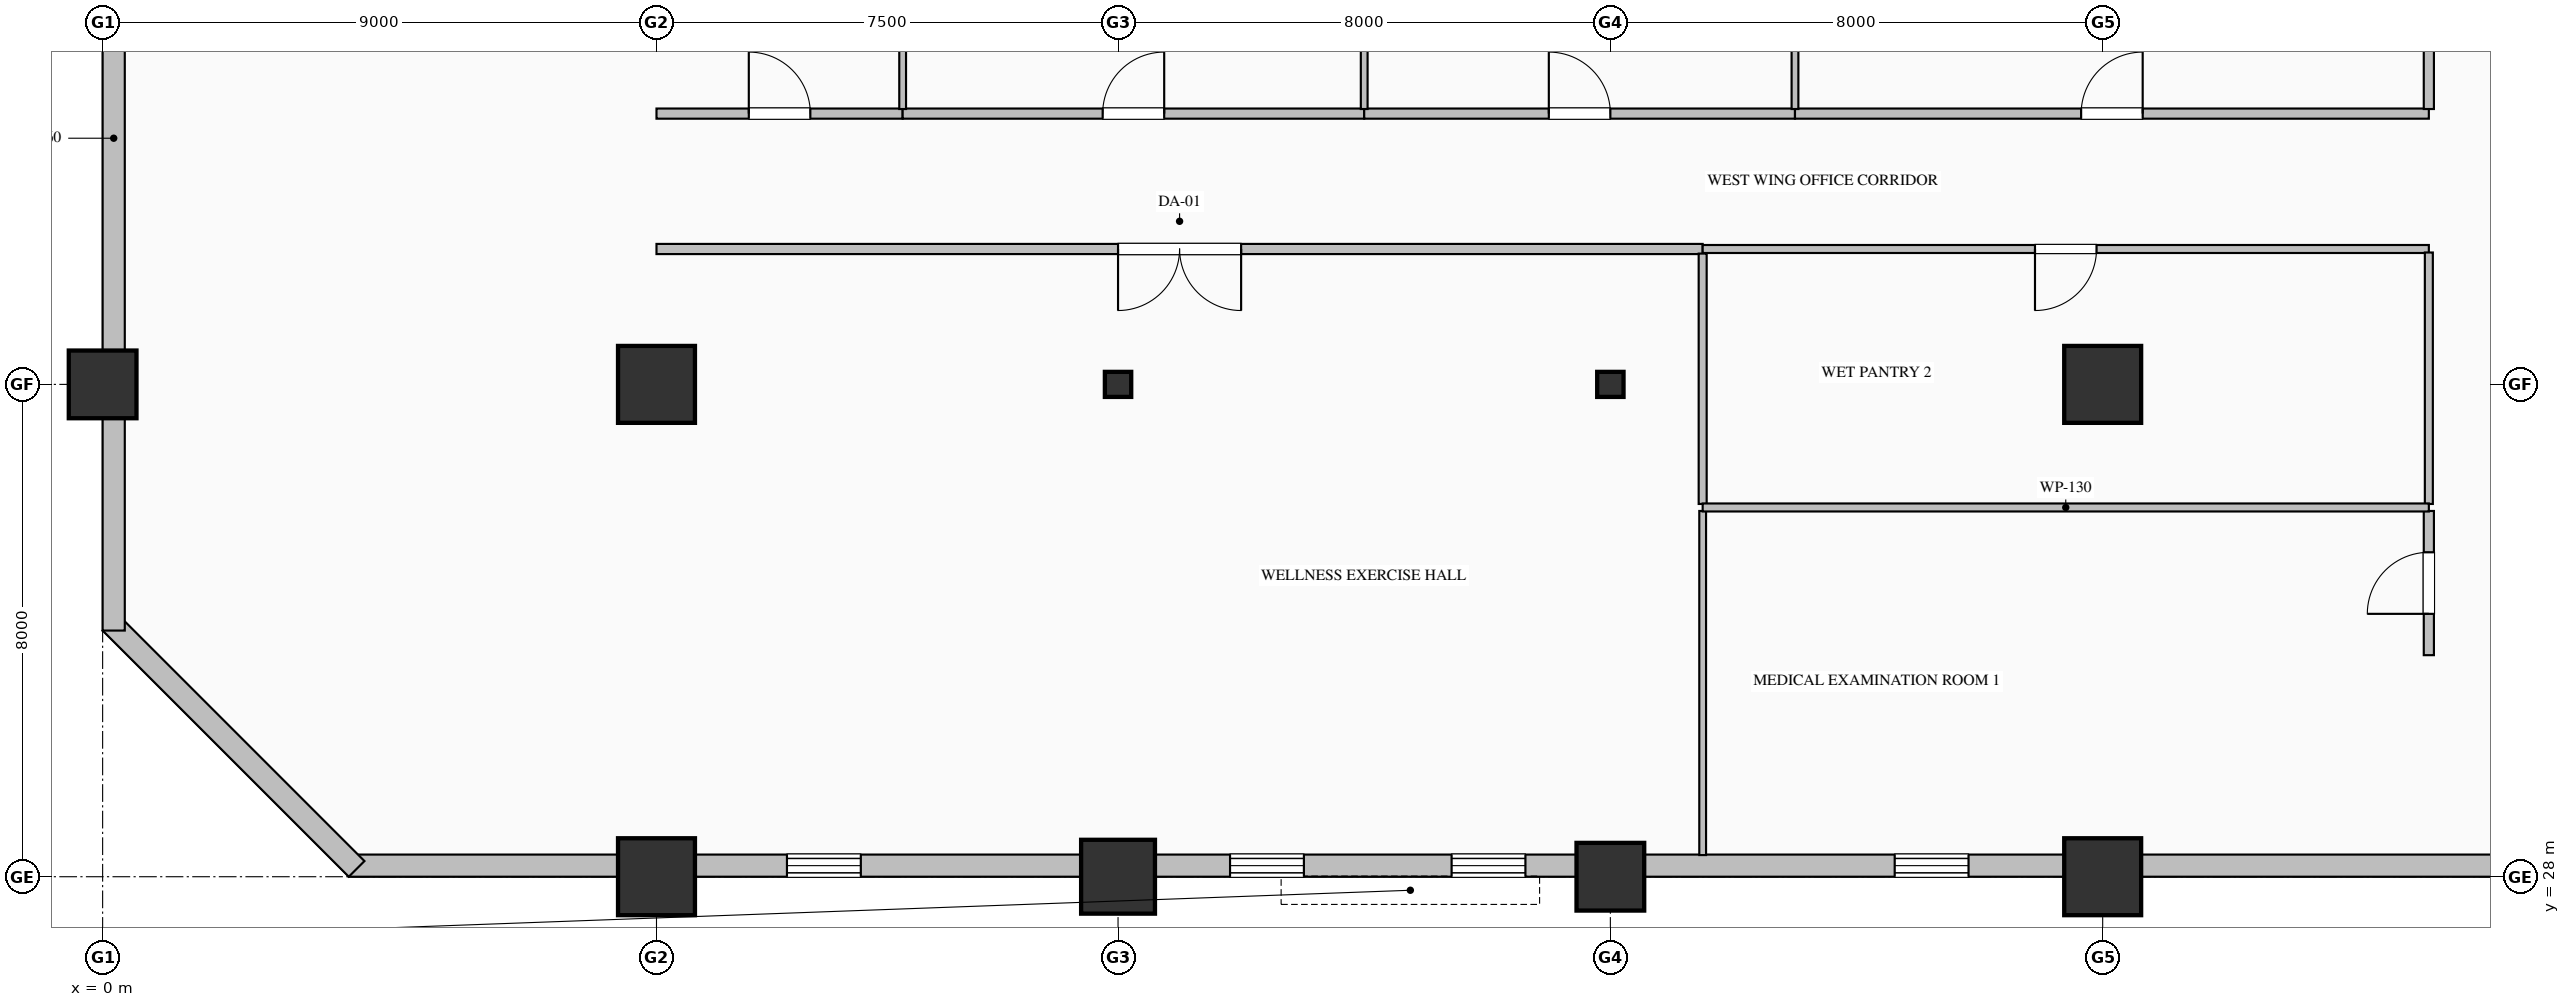
"""IFC4 building model, lengths in metres.
Left out: names, types, materials, properties, quantities, classifications, styles, units other than length and angle.
Written with IfcOpenShell. Run it as: python <this file> out.ifc"""

import sys

from ifc_helpers import new_model, si_unit, direction, frame, frame_2d, origin, origin_2d, place, context, subcontext, project, spatial, rectangle, hollow_rectangle, hollow_circle, i_section, extrude, element, fill, save


model = new_model("IFC4")
c1 = context("Model", 3, precision=1e-05, world=origin(), true_north=direction((0.0, 1.0)))
c2 = subcontext(c1, "Body", "Model", "MODEL_VIEW")
j1 = project(units=[si_unit("LENGTHUNIT", "METRE"), si_unit("PLANEANGLEUNIT", "RADIAN")], contexts=[c1])
p1 = place(None, origin())
s1 = spatial("IfcSite", under=j1, at=p1, CompositionType="ELEMENT")
p2 = place(p1, origin())
s2 = spatial("IfcBuilding", under=s1, at=p2, CompositionType="ELEMENT")
p3 = place(p2, frame((0.0, 0.0, 80.2)))
s3 = spatial("IfcBuildingStorey", under=s2, at=p3, CompositionType="ELEMENT", Elevation=80.2)
p4 = place(p3, frame((0.0, 36.0, 0.0), z_axis=(0.0, 0.0, 1.0), x_axis=(1.0, 0.0, 0.0)))
e1 = element("IfcColumn", 1, at=p4, inside=s3, PredefinedType="COLUMN", context=c2, shape_type="SweptSolid", body=[
    extrude(hollow_rectangle(XDim=1.1, YDim=1.1, WallThickness=0.04, at=origin_2d()), origin(), (0.0, 0.0, 1.0), 4.0),
])
for number, where, z_axis, x_axis in (
    (2, (9.0, 28.0, 0.0), (0.0, 0.0, 1.0), (1.0, 0.0, 0.0)),
    (3, (9.0, 36.0, 0.0), (0.0, 0.0, 1.0), (1.0, 0.0, 0.0)),
):
    element("IfcColumn", number, at=place(p3, frame(where, z_axis=z_axis, x_axis=x_axis)), inside=s3, PredefinedType="COLUMN", context=c2, shape_type="SweptSolid", body=[
        extrude(hollow_rectangle(XDim=1.25, YDim=1.25, WallThickness=0.045, at=origin_2d()), origin(), (0.0, 0.0, 1.0), 4.0),
    ])
p5 = place(p3, frame((16.5, 28.0, 0.0), z_axis=(0.0, 0.0, 1.0), x_axis=(1.0, 0.0, 0.0)))
e4 = element("IfcColumn", 4, at=p5, inside=s3, PredefinedType="COLUMN", context=c2, shape_type="SweptSolid", body=[
    extrude(hollow_circle(Radius=0.6, WallThickness=0.04, at=origin_2d()), origin(), (0.0, 0.0, 1.0), 4.0),
])
p6 = place(p3, frame((16.5, 36.0, 0.0), z_axis=(0.0, 0.0, 1.0), x_axis=(1.0, 0.0, 0.0)))
e5 = element("IfcColumn", 5, at=p6, inside=s3, PredefinedType="COLUMN", context=c2, shape_type="SweptSolid", body=[
    extrude(i_section(OverallWidth=0.407, OverallDepth=0.428, WebThickness=0.02, FlangeThickness=0.035, FilletRadius=0.022, at=origin_2d()), origin(), (0.0, 0.0, 1.0), 4.0),
])
p7 = place(p3, frame((24.5, 28.0, 0.0), z_axis=(0.0, 0.0, 1.0), x_axis=(1.0, 0.0, 0.0)))
e6 = element("IfcColumn", 6, at=p7, inside=s3, PredefinedType="COLUMN", context=c2, shape_type="SweptSolid", body=[
    extrude(hollow_rectangle(XDim=1.1, YDim=1.1, WallThickness=0.04, at=origin_2d()), origin(), (0.0, 0.0, 1.0), 4.0),
])
p8 = place(p3, frame((24.5, 36.0, 0.0), z_axis=(0.0, 0.0, 1.0), x_axis=(1.0, 0.0, 0.0)))
e7 = element("IfcColumn", 7, at=p8, inside=s3, PredefinedType="COLUMN", context=c2, shape_type="SweptSolid", body=[
    extrude(i_section(OverallWidth=0.407, OverallDepth=0.428, WebThickness=0.02, FlangeThickness=0.035, FilletRadius=0.022, at=origin_2d()), origin(), (0.0, 0.0, 1.0), 4.0),
])
for number, where, z_axis, x_axis in (
    (8, (32.5, 28.0, 0.0), (0.0, 0.0, 1.0), (1.0, 0.0, 0.0)),
    (9, (32.5, 36.0, 0.0), (0.0, 0.0, 1.0), (1.0, 0.0, 0.0)),
):
    element("IfcColumn", number, at=place(p3, frame(where, z_axis=z_axis, x_axis=x_axis)), inside=s3, PredefinedType="COLUMN", context=c2, shape_type="SweptSolid", body=[
        extrude(hollow_rectangle(XDim=1.25, YDim=1.25, WallThickness=0.045, at=origin_2d()), origin(), (0.0, 0.0, 1.0), 4.0),
    ])
p9 = place(p3, frame((40.52, 28.18, 0.0), z_axis=(0.0, 0.0, 1.0), x_axis=(-1.0, 0.0, 0.0)))
e10 = element("IfcWall", 10, at=p9, inside=s3, PredefinedType="SOLIDWALL", context=c2, shape_type="SweptSolid", body=[
    extrude(rectangle(XDim=36.52, YDim=0.36, at=frame_2d((18.26, 0.0))), origin(), (0.0, 0.0, 1.0), 3.05),
])
p10 = place(p9, frame((10.2, 0.0, 0.7)))
e11 = element("IfcOpeningElement", 11, at=p10, cuts=e10, PredefinedType="OPENING", context=c2, shape_type="SweptSolid", body=[
    extrude(rectangle(XDim=1.2, YDim=1.85, at=frame_2d((0.6, 0.925))), frame((0.0, 0.19, 0.0), z_axis=(0.0, -1.0, 0.0), x_axis=(1.0, 0.0, 0.0)), (0.0, 0.0, 1.0), 0.38),
])
p11 = place(p9, frame((17.4, 0.0, 0.7)))
e12 = element("IfcOpeningElement", 12, at=p11, cuts=e10, PredefinedType="OPENING", context=c2, shape_type="SweptSolid", body=[
    extrude(rectangle(XDim=1.2, YDim=1.85, at=frame_2d((0.6, 0.925))), frame((0.0, 0.19, 0.0), z_axis=(0.0, -1.0, 0.0), x_axis=(1.0, 0.0, 0.0)), (0.0, 0.0, 1.0), 0.38),
])
p12 = place(p9, frame((21.0, 0.0, 0.7)))
e13 = element("IfcOpeningElement", 13, at=p12, cuts=e10, PredefinedType="OPENING", context=c2, shape_type="SweptSolid", body=[
    extrude(rectangle(XDim=1.2, YDim=1.85, at=frame_2d((0.6, 0.925))), frame((0.0, 0.19, 0.0), z_axis=(0.0, -1.0, 0.0), x_axis=(1.0, 0.0, 0.0)), (0.0, 0.0, 1.0), 0.38),
])
p13 = place(p9, frame((28.2, 0.0, 0.7)))
e14 = element("IfcOpeningElement", 14, at=p13, cuts=e10, PredefinedType="OPENING", context=c2, shape_type="SweptSolid", body=[
    extrude(rectangle(XDim=1.2, YDim=1.85, at=frame_2d((0.6, 0.925))), frame((0.0, 0.19, 0.0), z_axis=(0.0, -1.0, 0.0), x_axis=(1.0, 0.0, 0.0)), (0.0, 0.0, 1.0), 0.38),
])
p14 = place(p3, frame((4.127, 28.127, 0.0), z_axis=(0.0, 0.0, 1.0), x_axis=(-0.707106781187, 0.707106781187, 0.0)))
e15 = element("IfcWall", 15, at=p14, inside=s3, PredefinedType="SOLIDWALL", context=c2, shape_type="SweptSolid", body=[
    extrude(rectangle(XDim=5.657, YDim=0.36, at=frame_2d((2.828, 0.0))), origin(), (0.0, 0.0, 1.0), 3.75),
])
p15 = place(p3, frame((0.18, 32.0, 0.0), z_axis=(0.0, 0.0, 1.0), x_axis=(0.0, 1.0, 0.0)))
e16 = element("IfcWall", 16, at=p15, inside=s3, PredefinedType="SOLIDWALL", context=c2, shape_type="SweptSolid", body=[
    extrude(rectangle(XDim=16.0, YDim=0.36, at=frame_2d((8.0, 0.0))), origin(), (0.0, 0.0, 1.0), 3.25),
])
p16 = place(p3, frame((9.0, 40.4, 0.0), z_axis=(0.0, 0.0, 1.0), x_axis=(1.0, 0.0, 0.0)))
e17 = element("IfcWall", 17, at=p16, inside=s3, PredefinedType="PARTITIONING", context=c2, shape_type="SweptSolid", body=[
    extrude(rectangle(XDim=4.0, YDim=0.165, at=frame_2d((2.0, 0.0))), origin(), (0.0, 0.0, 1.0), 3.75),
])
p17 = place(p16, frame((1.5, 0.0, 0.0)))
e18 = element("IfcOpeningElement", 18, at=p17, cuts=e17, PredefinedType="OPENING", context=c2, shape_type="SweptSolid", body=[
    extrude(rectangle(XDim=1.0, YDim=2.15, at=frame_2d((0.5, 1.075))), frame((0.0, 0.093, 0.0), z_axis=(0.0, -1.0, 0.0), x_axis=(1.0, 0.0, 0.0)), (0.0, 0.0, 1.0), 0.185),
])
p18 = place(p3, frame((13.0, 40.4, 0.0), z_axis=(0.0, 0.0, 1.0), x_axis=(1.0, 0.0, 0.0)))
e19 = element("IfcWall", 19, at=p18, inside=s3, PredefinedType="PARTITIONING", context=c2, shape_type="SweptSolid", body=[
    extrude(rectangle(XDim=7.5, YDim=0.165, at=frame_2d((3.75, 0.0))), origin(), (0.0, 0.0, 1.0), 3.75),
])
p19 = place(p18, frame((3.25, 0.0, 0.0)))
e20 = element("IfcOpeningElement", 20, at=p19, cuts=e19, PredefinedType="OPENING", context=c2, shape_type="SweptSolid", body=[
    extrude(rectangle(XDim=1.0, YDim=2.15, at=frame_2d((0.5, 1.075))), frame((0.0, 0.093, 0.0), z_axis=(0.0, -1.0, 0.0), x_axis=(1.0, 0.0, 0.0)), (0.0, 0.0, 1.0), 0.185),
])
p20 = place(p3, frame((20.5, 40.4, 0.0), z_axis=(0.0, 0.0, 1.0), x_axis=(1.0, 0.0, 0.0)))
e21 = element("IfcWall", 21, at=p20, inside=s3, PredefinedType="PARTITIONING", context=c2, shape_type="SweptSolid", body=[
    extrude(rectangle(XDim=7.0, YDim=0.165, at=frame_2d((3.5, 0.0))), origin(), (0.0, 0.0, 1.0), 3.75),
])
p21 = place(p20, frame((3.0, 0.0, 0.0)))
e22 = element("IfcOpeningElement", 22, at=p21, cuts=e21, PredefinedType="OPENING", context=c2, shape_type="SweptSolid", body=[
    extrude(rectangle(XDim=1.0, YDim=2.15, at=frame_2d((0.5, 1.075))), frame((0.0, 0.093, 0.0), z_axis=(0.0, -1.0, 0.0), x_axis=(1.0, 0.0, 0.0)), (0.0, 0.0, 1.0), 0.185),
])
p22 = place(p3, frame((27.5, 40.4, 0.0), z_axis=(0.0, 0.0, 1.0), x_axis=(1.0, 0.0, 0.0)))
e23 = element("IfcWall", 23, at=p22, inside=s3, PredefinedType="PARTITIONING", context=c2, shape_type="SweptSolid", body=[
    extrude(rectangle(XDim=10.3, YDim=0.165, at=frame_2d((5.15, 0.0))), origin(), (0.0, 0.0, 1.0), 3.75),
])
p23 = place(p22, frame((4.65, 0.0, 0.0)))
e24 = element("IfcOpeningElement", 24, at=p23, cuts=e23, PredefinedType="OPENING", context=c2, shape_type="SweptSolid", body=[
    extrude(rectangle(XDim=1.0, YDim=2.15, at=frame_2d((0.5, 1.075))), frame((0.0, 0.093, 0.0), z_axis=(0.0, -1.0, 0.0), x_axis=(1.0, 0.0, 0.0)), (0.0, 0.0, 1.0), 0.185),
])
p24 = place(p3, frame((26.0, 38.2, 0.0), z_axis=(0.0, 0.0, 1.0), x_axis=(-1.0, 0.0, 0.0)))
e25 = element("IfcWall", 25, at=p24, inside=s3, PredefinedType="PARTITIONING", context=c2, shape_type="SweptSolid", body=[
    extrude(rectangle(XDim=17.0, YDim=0.165, at=frame_2d((8.5, 0.0))), origin(), (0.0, 0.0, 1.0), 3.75),
])
p25 = place(p24, frame((7.5, 0.0, 0.0)))
e26 = element("IfcOpeningElement", 26, at=p25, cuts=e25, PredefinedType="OPENING", context=c2, shape_type="SweptSolid", body=[
    extrude(rectangle(XDim=2.0, YDim=2.4, at=frame_2d((1.0, 1.2))), frame((0.0, 0.093, 0.0), z_axis=(0.0, -1.0, 0.0), x_axis=(1.0, 0.0, 0.0)), (0.0, 0.0, 1.0), 0.185),
])
p26 = place(p3, frame((37.8, 38.2, 0.0), z_axis=(0.0, 0.0, 1.0), x_axis=(-1.0, 0.0, 0.0)))
e27 = element("IfcWall", 27, at=p26, inside=s3, PredefinedType="PARTITIONING", context=c2, shape_type="SweptSolid", body=[
    extrude(rectangle(XDim=11.8, YDim=0.13, at=frame_2d((5.9, 0.0))), origin(), (0.0, 0.0, 1.0), 3.75),
])
p27 = place(p26, frame((5.4, 0.0, 0.0)))
e28 = element("IfcOpeningElement", 28, at=p27, cuts=e27, PredefinedType="OPENING", context=c2, shape_type="SweptSolid", body=[
    extrude(rectangle(XDim=1.0, YDim=2.15, at=frame_2d((0.5, 1.075))), frame((0.0, 0.075, 0.0), z_axis=(0.0, -1.0, 0.0), x_axis=(1.0, 0.0, 0.0)), (0.0, 0.0, 1.0), 0.15),
])
p28 = place(p3, frame((37.8, 40.475, 0.0), z_axis=(0.0, 0.0, 1.0), x_axis=(0.0, 1.0, 0.0)))
e29 = element("IfcWall", 29, at=p28, inside=s3, PredefinedType="PARTITIONING", context=c2, shape_type="SweptSolid", body=[
    extrude(rectangle(XDim=3.651, YDim=0.165, at=frame_2d((1.825, 0.0))), origin(), (0.0, 0.0, 1.0), 3.75),
])
p29 = place(p3, frame((37.8, 31.6, 0.0), z_axis=(0.0, 0.0, 1.0), x_axis=(0.0, 1.0, 0.0)))
e30 = element("IfcWall", 30, at=p29, inside=s3, PredefinedType="PARTITIONING", context=c2, shape_type="SweptSolid", body=[
    extrude(rectangle(XDim=2.343, YDim=0.165, at=frame_2d((1.171, 0.0))), origin(), (0.0, 0.0, 1.0), 3.75),
])
p30 = place(p29, frame((0.671, 0.0, 0.0)))
e31 = element("IfcOpeningElement", 31, at=p30, cuts=e30, PredefinedType="OPENING", context=c2, shape_type="SweptSolid", body=[
    extrude(rectangle(XDim=1.0, YDim=2.15, at=frame_2d((0.5, 1.075))), frame((0.0, 0.093, 0.0), z_axis=(0.0, -1.0, 0.0), x_axis=(1.0, 0.0, 0.0)), (0.0, 0.0, 1.0), 0.185),
])
p31 = place(p3, frame((37.8, 34.057, 0.0), z_axis=(0.0, 0.0, 1.0), x_axis=(0.0, 1.0, 0.0)))
e32 = element("IfcWall", 32, at=p31, inside=s3, PredefinedType="PARTITIONING", context=c2, shape_type="SweptSolid", body=[
    extrude(rectangle(XDim=4.086, YDim=0.13, at=frame_2d((2.043, 0.0))), origin(), (0.0, 0.0, 1.0), 3.75),
])
for number, where, z_axis, x_axis in (
    (33, (13.0, 51.648, 0.0), (0.0, 0.0, 1.0), (0.0, -1.0, 0.0)),
    (34, (20.5, 51.648, 0.0), (0.0, 0.0, 1.0), (0.0, -1.0, 0.0)),
    (35, (27.5, 51.648, 0.0), (0.0, 0.0, 1.0), (0.0, -1.0, 0.0)),
):
    element("IfcWall", number, at=place(p3, frame(where, z_axis=z_axis, x_axis=x_axis)), inside=s3, PredefinedType="MOVABLE", context=c2, shape_type="SweptSolid", body=[
        extrude(rectangle(XDim=11.173, YDim=0.11, at=frame_2d((5.587, 0.0))), origin(), (0.0, 0.0, 1.0), 3.75),
    ])
p32 = place(p3, frame((26.0, 33.943, 0.0), z_axis=(0.0, 0.0, 1.0), x_axis=(0.0, -1.0, 0.0)))
e36 = element("IfcWall", 36, at=p32, inside=s3, PredefinedType="MOVABLE", context=c2, shape_type="SweptSolid", body=[
    extrude(rectangle(XDim=5.591, YDim=0.11, at=frame_2d((2.795, 0.0))), origin(), (0.0, 0.0, 1.0), 3.75),
])
p33 = place(p3, frame((26.0, 38.125, 0.0), z_axis=(0.0, 0.0, 1.0), x_axis=(0.0, -1.0, 0.0)))
e37 = element("IfcWall", 37, at=p33, inside=s3, PredefinedType="PARTITIONING", context=c2, shape_type="SweptSolid", body=[
    extrude(rectangle(XDim=4.069, YDim=0.13, at=frame_2d((2.034, 0.0))), origin(), (0.0, 0.0, 1.0), 3.75),
])
p34 = place(p3, frame((26.0, 34.0, 0.0), z_axis=(0.0, 0.0, 1.0), x_axis=(1.0, 0.0, 0.0)))
e38 = element("IfcWall", 38, at=p34, inside=s3, PredefinedType="PARTITIONING", context=c2, shape_type="SweptSolid", body=[
    extrude(rectangle(XDim=11.8, YDim=0.13, at=frame_2d((5.9, 0.0))), origin(), (0.0, 0.0, 1.0), 3.75),
])
p35 = place(p10, origin())
e39 = element("IfcWindow", 39, at=p35, inside=s3, PartitioningType="DOUBLE_PANEL_VERTICAL", PredefinedType="WINDOW", context=c2, shape_type="SweptSolid", body=[
    extrude(rectangle(XDim=1.2, YDim=1.85, at=frame_2d((0.6, 0.925))), frame((0.0, 0.15, 0.0), z_axis=(0.0, -1.0, 0.0), x_axis=(1.0, 0.0, 0.0)), (0.0, 0.0, 1.0), 0.06),
])
fill(e11, e39)
p36 = place(p11, origin())
e40 = element("IfcWindow", 40, at=p36, inside=s3, PartitioningType="DOUBLE_PANEL_VERTICAL", PredefinedType="WINDOW", context=c2, shape_type="SweptSolid", body=[
    extrude(rectangle(XDim=1.2, YDim=1.85, at=frame_2d((0.6, 0.925))), frame((0.0, 0.15, 0.0), z_axis=(0.0, -1.0, 0.0), x_axis=(1.0, 0.0, 0.0)), (0.0, 0.0, 1.0), 0.06),
])
fill(e12, e40)
p37 = place(p12, origin())
e41 = element("IfcWindow", 41, at=p37, inside=s3, PartitioningType="DOUBLE_PANEL_VERTICAL", PredefinedType="WINDOW", context=c2, shape_type="SweptSolid", body=[
    extrude(rectangle(XDim=1.2, YDim=1.85, at=frame_2d((0.6, 0.925))), frame((0.0, 0.15, 0.0), z_axis=(0.0, -1.0, 0.0), x_axis=(1.0, 0.0, 0.0)), (0.0, 0.0, 1.0), 0.06),
])
fill(e13, e41)
p38 = place(p13, origin())
e42 = element("IfcWindow", 42, at=p38, inside=s3, PartitioningType="DOUBLE_PANEL_VERTICAL", PredefinedType="WINDOW", context=c2, shape_type="SweptSolid", body=[
    extrude(rectangle(XDim=1.2, YDim=1.85, at=frame_2d((0.6, 0.925))), frame((0.0, 0.15, 0.0), z_axis=(0.0, -1.0, 0.0), x_axis=(1.0, 0.0, 0.0)), (0.0, 0.0, 1.0), 0.06),
])
fill(e14, e42)
p39 = place(p17, origin())
e43 = element("IfcDoor", 43, at=p39, inside=s3, OperationType="SINGLE_SWING_LEFT", PredefinedType="DOOR", context=c2, shape_type="SweptSolid", body=[
    extrude(rectangle(XDim=1.0, YDim=2.15, at=frame_2d((0.5, 1.075))), frame((0.0, 0.025, 0.0), z_axis=(0.0, -1.0, 0.0), x_axis=(1.0, 0.0, 0.0)), (0.0, 0.0, 1.0), 0.05),
])
fill(e18, e43)
p40 = place(p19, origin())
e44 = element("IfcDoor", 44, at=p40, inside=s3, OperationType="SINGLE_SWING_RIGHT", PredefinedType="DOOR", context=c2, shape_type="SweptSolid", body=[
    extrude(rectangle(XDim=1.0, YDim=2.15, at=frame_2d((0.5, 1.075))), frame((0.0, 0.025, 0.0), z_axis=(0.0, -1.0, 0.0), x_axis=(1.0, 0.0, 0.0)), (0.0, 0.0, 1.0), 0.05),
])
fill(e20, e44)
p41 = place(p21, origin())
e45 = element("IfcDoor", 45, at=p41, inside=s3, OperationType="SINGLE_SWING_LEFT", PredefinedType="DOOR", context=c2, shape_type="SweptSolid", body=[
    extrude(rectangle(XDim=1.0, YDim=2.15, at=frame_2d((0.5, 1.075))), frame((0.0, 0.025, 0.0), z_axis=(0.0, -1.0, 0.0), x_axis=(1.0, 0.0, 0.0)), (0.0, 0.0, 1.0), 0.05),
])
fill(e22, e45)
p42 = place(p23, origin())
e46 = element("IfcDoor", 46, at=p42, inside=s3, OperationType="SINGLE_SWING_RIGHT", PredefinedType="DOOR", context=c2, shape_type="SweptSolid", body=[
    extrude(rectangle(XDim=1.0, YDim=2.15, at=frame_2d((0.5, 1.075))), frame((0.0, 0.025, 0.0), z_axis=(0.0, -1.0, 0.0), x_axis=(1.0, 0.0, 0.0)), (0.0, 0.0, 1.0), 0.05),
])
fill(e24, e46)
p43 = place(p25, origin())
e47 = element("IfcDoor", 47, at=p43, inside=s3, OperationType="DOUBLE_DOOR_SINGLE_SWING", PredefinedType="DOOR", context=c2, shape_type="SweptSolid", body=[
    extrude(rectangle(XDim=2.0, YDim=2.4, at=frame_2d((1.0, 1.2))), frame((0.0, 0.025, 0.0), z_axis=(0.0, -1.0, 0.0), x_axis=(1.0, 0.0, 0.0)), (0.0, 0.0, 1.0), 0.05),
])
fill(e26, e47)
p44 = place(p30, origin())
e48 = element("IfcDoor", 48, at=p44, inside=s3, OperationType="SINGLE_SWING_LEFT", PredefinedType="DOOR", context=c2, shape_type="SweptSolid", body=[
    extrude(rectangle(XDim=1.0, YDim=2.15, at=frame_2d((0.5, 1.075))), frame((0.0, 0.025, 0.0), z_axis=(0.0, -1.0, 0.0), x_axis=(1.0, 0.0, 0.0)), (0.0, 0.0, 1.0), 0.05),
])
fill(e31, e48)
p45 = place(p27, origin())
e49 = element("IfcDoor", 49, at=p45, inside=s3, OperationType="SINGLE_SWING_RIGHT", PredefinedType="DOOR", context=c2, shape_type="SweptSolid", body=[
    extrude(rectangle(XDim=1.0, YDim=2.15, at=frame_2d((0.5, 1.075))), frame((0.0, 0.025, 0.0), z_axis=(0.0, -1.0, 0.0), x_axis=(1.0, 0.0, 0.0)), (0.0, 0.0, 1.0), 0.05),
])
fill(e28, e49)
save(model, sys.argv[1])
